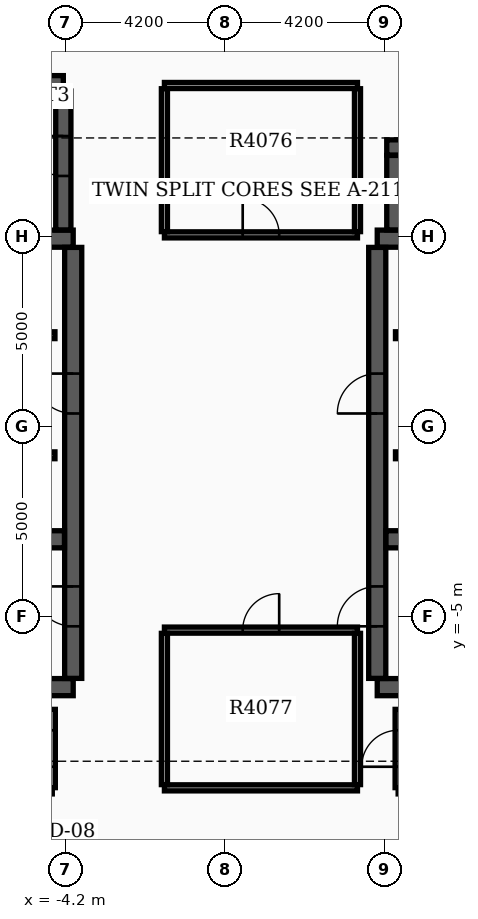
"""IFC4 building model, lengths in metres.
Left out: names, types, materials, properties, quantities, classifications, styles, units other than length and angle.
Written with IfcOpenShell. Run it as: python <this file> out.ifc"""

import sys

from ifc_helpers import new_model, si_unit, direction, frame, frame_2d, origin, place, context, subcontext, project, spatial, rectangle, extrude, element, fill, save


model = new_model("IFC4")
c1 = context("Model", 3, precision=1e-05, world=origin(), true_north=direction((0.0, 1.0)))
c2 = subcontext(c1, "Body", "Model", "MODEL_VIEW")
j1 = project(units=[si_unit("LENGTHUNIT", "METRE"), si_unit("PLANEANGLEUNIT", "RADIAN")], contexts=[c1])
p1 = place(None, origin())
s1 = spatial("IfcSite", under=j1, at=p1, CompositionType="ELEMENT")
p2 = place(p1, origin())
s2 = spatial("IfcBuilding", under=s1, at=p2, CompositionType="ELEMENT")
p3 = place(p2, frame((0.0, 0.0, 257.7)))
s3 = spatial("IfcBuildingStorey", under=s2, at=p3, CompositionType="ELEMENT", Elevation=257.7)
for number, where, z_axis, x_axis in (
    (1, (-12.4, -6.85, 0.0), (0.0, 0.0, 1.0), (1.0, 0.0, 0.0)),
    (2, (-12.4, 4.95, 0.0), (0.0, 0.0, 1.0), (1.0, 0.0, 0.0)),
):
    element("IfcWall", number, at=place(p3, frame(where, z_axis=z_axis, x_axis=x_axis)), inside=s3, PredefinedType="SHEAR", context=c2, shape_type="SweptSolid", body=[
        extrude(rectangle(XDim=8.4, YDim=0.45, at=frame_2d((4.2, 0.0))), origin(), (0.0, 0.0, 1.0), 3.7),
    ])
p4 = place(p3, frame((-4.0, -6.62, 0.0), z_axis=(0.0, 0.0, 1.0), x_axis=(0.0, 1.0, 0.0)))
e3 = element("IfcWall", 3, at=p4, inside=s3, PredefinedType="SHEAR", context=c2, shape_type="SweptSolid", body=[
    extrude(rectangle(XDim=11.34, YDim=0.45, at=frame_2d((5.67, 0.0))), origin(), (0.0, 0.0, 1.0), 3.7),
])
p5 = place(p4, frame((1.37, 0.0, 0.0)))
e4 = element("IfcOpeningElement", 4, at=p5, cuts=e3, PredefinedType="OPENING", context=c2, shape_type="SweptSolid", body=[
    extrude(rectangle(XDim=1.05, YDim=2.15, at=frame_2d((0.525, 1.075))), frame((0.0, 0.235, 0.0), z_axis=(0.0, -1.0, 0.0), x_axis=(1.0, 0.0, 0.0)), (0.0, 0.0, 1.0), 0.47),
])
p6 = place(p4, frame((6.97, 0.0, 0.0)))
e5 = element("IfcOpeningElement", 5, at=p6, cuts=e3, PredefinedType="OPENING", context=c2, shape_type="SweptSolid", body=[
    extrude(rectangle(XDim=1.05, YDim=2.15, at=frame_2d((0.525, 1.075))), frame((0.0, 0.235, 0.0), z_axis=(0.0, -1.0, 0.0), x_axis=(1.0, 0.0, 0.0)), (0.0, 0.0, 1.0), 0.47),
])
p7 = place(p3, frame((-12.17, -2.96, 0.0), z_axis=(0.0, 0.0, 1.0), x_axis=(1.0, 0.0, 0.0)))
e6 = element("IfcWall", 6, at=p7, inside=s3, PredefinedType="SHEAR", context=c2, shape_type="SweptSolid", body=[
    extrude(rectangle(XDim=7.94, YDim=0.45, at=frame_2d((3.97, 0.0))), origin(), (0.0, 0.0, 1.0), 3.7),
])
for number, where, z_axis, x_axis in (
    (7, (4.0, -6.85, 0.0), (0.0, 0.0, 1.0), (1.0, 0.0, 0.0)),
    (8, (4.0, 4.95, 0.0), (0.0, 0.0, 1.0), (1.0, 0.0, 0.0)),
):
    element("IfcWall", number, at=place(p3, frame(where, z_axis=z_axis, x_axis=x_axis)), inside=s3, PredefinedType="SHEAR", context=c2, shape_type="SweptSolid", body=[
        extrude(rectangle(XDim=8.4, YDim=0.45, at=frame_2d((4.2, 0.0))), origin(), (0.0, 0.0, 1.0), 3.7),
    ])
p8 = place(p3, frame((4.0, -6.62, 0.0), z_axis=(0.0, 0.0, 1.0), x_axis=(0.0, 1.0, 0.0)))
e9 = element("IfcWall", 9, at=p8, inside=s3, PredefinedType="SHEAR", context=c2, shape_type="SweptSolid", body=[
    extrude(rectangle(XDim=11.34, YDim=0.45, at=frame_2d((5.67, 0.0))), origin(), (0.0, 0.0, 1.0), 3.7),
])
p9 = place(p8, frame((1.37, 0.0, 0.0)))
e10 = element("IfcOpeningElement", 10, at=p9, cuts=e9, PredefinedType="OPENING", context=c2, shape_type="SweptSolid", body=[
    extrude(rectangle(XDim=1.05, YDim=2.15, at=frame_2d((0.525, 1.075))), frame((0.0, 0.235, 0.0), z_axis=(0.0, -1.0, 0.0), x_axis=(1.0, 0.0, 0.0)), (0.0, 0.0, 1.0), 0.47),
])
p10 = place(p8, frame((6.97, 0.0, 0.0)))
e11 = element("IfcOpeningElement", 11, at=p10, cuts=e9, PredefinedType="OPENING", context=c2, shape_type="SweptSolid", body=[
    extrude(rectangle(XDim=1.05, YDim=2.15, at=frame_2d((0.525, 1.075))), frame((0.0, 0.235, 0.0), z_axis=(0.0, -1.0, 0.0), x_axis=(1.0, 0.0, 0.0)), (0.0, 0.0, 1.0), 0.47),
])
p11 = place(p3, frame((4.23, -2.96, 0.0), z_axis=(0.0, 0.0, 1.0), x_axis=(1.0, 0.0, 0.0)))
e12 = element("IfcWall", 12, at=p11, inside=s3, PredefinedType="SHEAR", context=c2, shape_type="SweptSolid", body=[
    extrude(rectangle(XDim=7.94, YDim=0.45, at=frame_2d((3.97, 0.0))), origin(), (0.0, 0.0, 1.0), 3.7),
])
p12 = place(p3, frame((-12.22, 9.04, 0.0), z_axis=(0.0, 0.0, 1.0), x_axis=(1.0, 0.0, 0.0)))
e13 = element("IfcWall", 13, at=p12, inside=s3, PredefinedType="SHEAR", context=c2, shape_type="SweptSolid", body=[
    extrude(rectangle(XDim=7.96, YDim=0.4, at=frame_2d((3.98, 0.0))), origin(), (0.0, 0.0, 1.0), 3.7),
])
p13 = place(p3, frame((-4.26, 5.18, 0.0), z_axis=(0.0, 0.0, 1.0), x_axis=(0.0, 1.0, 0.0)))
e14 = element("IfcWall", 14, at=p13, inside=s3, PredefinedType="SHEAR", context=c2, shape_type="SweptSolid", body=[
    extrude(rectangle(XDim=3.655, YDim=0.4, at=frame_2d((1.828, 0.0))), origin(), (0.0, 0.0, 1.0), 3.7),
])
p14 = place(p13, frame((1.42, 0.0, 0.0)))
e15 = element("IfcOpeningElement", 15, at=p14, cuts=e14, PredefinedType="OPENING", context=c2, shape_type="SweptSolid", body=[
    extrude(rectangle(XDim=1.05, YDim=2.15, at=frame_2d((0.525, 1.075))), frame((0.0, 0.21, 0.0), z_axis=(0.0, -1.0, 0.0), x_axis=(1.0, 0.0, 0.0)), (0.0, 0.0, 1.0), 0.42),
])
p15 = place(p3, frame((4.45, 5.18, 0.0), z_axis=(0.0, 0.0, 1.0), x_axis=(0.0, 1.0, 0.0)))
e16 = element("IfcWall", 16, at=p15, inside=s3, PredefinedType="SHEAR", context=c2, shape_type="SweptSolid", body=[
    extrude(rectangle(XDim=1.96, YDim=0.4, at=frame_2d((0.98, 0.0))), origin(), (0.0, 0.0, 1.0), 3.7),
])
p16 = place(p3, frame((4.25, 7.35, 0.0), z_axis=(0.0, 0.0, 1.0), x_axis=(1.0, 0.0, 0.0)))
e17 = element("IfcWall", 17, at=p16, inside=s3, PredefinedType="SHEAR", context=c2, shape_type="SweptSolid", body=[
    extrude(rectangle(XDim=5.4, YDim=0.4, at=frame_2d((2.7, 0.0))), origin(), (0.0, 0.0, 1.0), 3.7),
])
p17 = place(p3, frame((-11.9, 2.41, 0.0), z_axis=(0.0, 0.0, 1.0), x_axis=(1.0, 0.0, 0.0)))
e18 = element("IfcWall", 18, at=p17, inside=s3, PredefinedType="SOLIDWALL", context=c2, shape_type="SweptSolid", body=[
    extrude(rectangle(XDim=7.42, YDim=0.18, at=frame_2d((3.71, 0.0))), origin(), (0.0, 0.0, 1.0), 3.17),
])
p18 = place(p17, frame((0.55, 0.0, 0.0)))
e19 = element("IfcOpeningElement", 19, at=p18, cuts=e18, PredefinedType="OPENING", context=c2, shape_type="SweptSolid", body=[
    extrude(rectangle(XDim=1.1, YDim=2.15, at=frame_2d((0.55, 1.075))), frame((0.0, 0.1, 0.0), z_axis=(0.0, -1.0, 0.0), x_axis=(1.0, 0.0, 0.0)), (0.0, 0.0, 1.0), 0.2),
])
p19 = place(p17, frame((4.9, 0.0, 0.0)))
e20 = element("IfcOpeningElement", 20, at=p19, cuts=e18, PredefinedType="OPENING", context=c2, shape_type="SweptSolid", body=[
    extrude(rectangle(XDim=0.88, YDim=2.1, at=frame_2d((0.44, 1.05))), frame((0.0, 0.1, 0.0), z_axis=(0.0, -1.0, 0.0), x_axis=(1.0, 0.0, 0.0)), (0.0, 0.0, 1.0), 0.2),
])
p20 = place(p3, frame((4.48, 2.41, 0.0), z_axis=(0.0, 0.0, 1.0), x_axis=(1.0, 0.0, 0.0)))
e21 = element("IfcWall", 21, at=p20, inside=s3, PredefinedType="SOLIDWALL", context=c2, shape_type="SweptSolid", body=[
    extrude(rectangle(XDim=7.42, YDim=0.18, at=frame_2d((3.71, 0.0))), origin(), (0.0, 0.0, 1.0), 3.17),
])
p21 = place(p20, frame((5.67, 0.0, 0.0)))
e22 = element("IfcOpeningElement", 22, at=p21, cuts=e21, PredefinedType="OPENING", context=c2, shape_type="SweptSolid", body=[
    extrude(rectangle(XDim=1.1, YDim=2.15, at=frame_2d((0.55, 1.075))), frame((0.0, 0.1, 0.0), z_axis=(0.0, -1.0, 0.0), x_axis=(1.0, 0.0, 0.0)), (0.0, 0.0, 1.0), 0.2),
])
p22 = place(p20, frame((1.6, 0.0, 0.0)))
e23 = element("IfcOpeningElement", 23, at=p22, cuts=e21, PredefinedType="OPENING", context=c2, shape_type="SweptSolid", body=[
    extrude(rectangle(XDim=0.88, YDim=2.1, at=frame_2d((0.44, 1.05))), frame((0.0, 0.1, 0.0), z_axis=(0.0, -1.0, 0.0), x_axis=(1.0, 0.0, 0.0)), (0.0, 0.0, 1.0), 0.2),
])
p23 = place(p3, frame((-11.9, -0.75, 0.0), z_axis=(0.0, 0.0, 1.0), x_axis=(1.0, 0.0, 0.0)))
e24 = element("IfcWall", 24, at=p23, inside=s3, PredefinedType="SOLIDWALL", context=c2, shape_type="SweptSolid", body=[
    extrude(rectangle(XDim=7.42, YDim=0.18, at=frame_2d((3.71, 0.0))), origin(), (0.0, 0.0, 1.0), 3.17),
])
p24 = place(p23, frame((5.75, 0.0, 0.0)))
e25 = element("IfcOpeningElement", 25, at=p24, cuts=e24, PredefinedType="OPENING", context=c2, shape_type="SweptSolid", body=[
    extrude(rectangle(XDim=1.1, YDim=2.15, at=frame_2d((0.55, 1.075))), frame((0.0, 0.1, 0.0), z_axis=(0.0, -1.0, 0.0), x_axis=(1.0, 0.0, 0.0)), (0.0, 0.0, 1.0), 0.2),
])
p25 = place(p23, frame((1.6, 0.0, 0.0)))
e26 = element("IfcOpeningElement", 26, at=p25, cuts=e24, PredefinedType="OPENING", context=c2, shape_type="SweptSolid", body=[
    extrude(rectangle(XDim=0.88, YDim=2.1, at=frame_2d((0.44, 1.05))), frame((0.0, 0.1, 0.0), z_axis=(0.0, -1.0, 0.0), x_axis=(1.0, 0.0, 0.0)), (0.0, 0.0, 1.0), 0.2),
])
p26 = place(p3, frame((4.48, -0.75, 0.0), z_axis=(0.0, 0.0, 1.0), x_axis=(1.0, 0.0, 0.0)))
e27 = element("IfcWall", 27, at=p26, inside=s3, PredefinedType="SOLIDWALL", context=c2, shape_type="SweptSolid", body=[
    extrude(rectangle(XDim=7.42, YDim=0.18, at=frame_2d((3.71, 0.0))), origin(), (0.0, 0.0, 1.0), 3.17),
])
p27 = place(p26, frame((3.92, 0.0, 0.0)))
e28 = element("IfcOpeningElement", 28, at=p27, cuts=e27, PredefinedType="OPENING", context=c2, shape_type="SweptSolid", body=[
    extrude(rectangle(XDim=1.1, YDim=2.15, at=frame_2d((0.55, 1.075))), frame((0.0, 0.1, 0.0), z_axis=(0.0, -1.0, 0.0), x_axis=(1.0, 0.0, 0.0)), (0.0, 0.0, 1.0), 0.2),
])
p28 = place(p26, frame((5.82, 0.0, 0.0)))
e29 = element("IfcOpeningElement", 29, at=p28, cuts=e27, PredefinedType="OPENING", context=c2, shape_type="SweptSolid", body=[
    extrude(rectangle(XDim=1.1, YDim=2.15, at=frame_2d((0.55, 1.075))), frame((0.0, 0.1, 0.0), z_axis=(0.0, -1.0, 0.0), x_axis=(1.0, 0.0, 0.0)), (0.0, 0.0, 1.0), 0.2),
])
p29 = place(p26, frame((1.6, 0.0, 0.0)))
e30 = element("IfcOpeningElement", 30, at=p29, cuts=e27, PredefinedType="OPENING", context=c2, shape_type="SweptSolid", body=[
    extrude(rectangle(XDim=0.88, YDim=2.1, at=frame_2d((0.44, 1.05))), frame((0.0, 0.1, 0.0), z_axis=(0.0, -1.0, 0.0), x_axis=(1.0, 0.0, 0.0)), (0.0, 0.0, 1.0), 0.2),
])
p30 = place(p3, frame((-1.6, 5.05, 0.0), z_axis=(0.0, 0.0, 1.0), x_axis=(1.0, 0.0, 0.0)))
e31 = element("IfcWall", 31, at=p30, inside=s3, PredefinedType="PARTITIONING", context=c2, shape_type="SweptSolid", body=[
    extrude(rectangle(XDim=5.08, YDim=0.16, at=frame_2d((2.54, 0.0))), origin(), (0.0, 0.0, 1.0), 3.17),
])
p31 = place(p30, frame((2.06, 0.0, 0.0)))
e32 = element("IfcOpeningElement", 32, at=p31, cuts=e31, PredefinedType="OPENING", context=c2, shape_type="SweptSolid", body=[
    extrude(rectangle(XDim=0.96, YDim=2.15, at=frame_2d((0.48, 1.075))), frame((0.0, 0.09, 0.0), z_axis=(0.0, -1.0, 0.0), x_axis=(1.0, 0.0, 0.0)), (0.0, 0.0, 1.0), 0.18),
])
p32 = place(p3, frame((-1.6, 8.98, 0.0), z_axis=(0.0, 0.0, 1.0), x_axis=(1.0, 0.0, 0.0)))
e33 = element("IfcWall", 33, at=p32, inside=s3, PredefinedType="PARTITIONING", context=c2, shape_type="SweptSolid", body=[
    extrude(rectangle(XDim=5.08, YDim=0.16, at=frame_2d((2.54, 0.0))), origin(), (0.0, 0.0, 1.0), 3.17),
])
for number, where, z_axis, x_axis in (
    (34, (-1.6, 5.135, 0.0), (0.0, 0.0, 1.0), (0.0, 1.0, 0.0)),
    (35, (3.48, 5.135, 0.0), (0.0, 0.0, 1.0), (0.0, 1.0, 0.0)),
):
    element("IfcWall", number, at=place(p3, frame(where, z_axis=z_axis, x_axis=x_axis)), inside=s3, PredefinedType="PARTITIONING", context=c2, shape_type="SweptSolid", body=[
        extrude(rectangle(XDim=3.76, YDim=0.16, at=frame_2d((1.88, 0.0))), origin(), (0.0, 0.0, 1.0), 3.17),
    ])
p33 = place(p3, frame((-1.6, -9.5, 0.0), z_axis=(0.0, 0.0, 1.0), x_axis=(1.0, 0.0, 0.0)))
e36 = element("IfcWall", 36, at=p33, inside=s3, PredefinedType="PARTITIONING", context=c2, shape_type="SweptSolid", body=[
    extrude(rectangle(XDim=5.08, YDim=0.16, at=frame_2d((2.54, 0.0))), origin(), (0.0, 0.0, 1.0), 3.17),
])
p34 = place(p3, frame((-1.6, -5.35, 0.0), z_axis=(0.0, 0.0, 1.0), x_axis=(1.0, 0.0, 0.0)))
e37 = element("IfcWall", 37, at=p34, inside=s3, PredefinedType="PARTITIONING", context=c2, shape_type="SweptSolid", body=[
    extrude(rectangle(XDim=5.08, YDim=0.16, at=frame_2d((2.54, 0.0))), origin(), (0.0, 0.0, 1.0), 3.17),
])
p35 = place(p34, frame((2.06, 0.0, 0.0)))
e38 = element("IfcOpeningElement", 38, at=p35, cuts=e37, PredefinedType="OPENING", context=c2, shape_type="SweptSolid", body=[
    extrude(rectangle(XDim=0.96, YDim=2.15, at=frame_2d((0.48, 1.075))), frame((0.0, 0.09, 0.0), z_axis=(0.0, -1.0, 0.0), x_axis=(1.0, 0.0, 0.0)), (0.0, 0.0, 1.0), 0.18),
])
for number, where, z_axis, x_axis in (
    (39, (-1.6, -9.415, 0.0), (0.0, 0.0, 1.0), (0.0, 1.0, 0.0)),
    (40, (3.48, -9.415, 0.0), (0.0, 0.0, 1.0), (0.0, 1.0, 0.0)),
):
    element("IfcWall", number, at=place(p3, frame(where, z_axis=z_axis, x_axis=x_axis)), inside=s3, PredefinedType="PARTITIONING", context=c2, shape_type="SweptSolid", body=[
        extrude(rectangle(XDim=3.98, YDim=0.16, at=frame_2d((1.99, 0.0))), origin(), (0.0, 0.0, 1.0), 3.17),
    ])
p36 = place(p3, frame((4.55, -9.58, 0.0), z_axis=(0.0, 0.0, 1.0), x_axis=(1.0, 0.0, 0.0)))
e41 = element("IfcWall", 41, at=p36, inside=s3, PredefinedType="PARTITIONING", context=c2, shape_type="SweptSolid", body=[
    extrude(rectangle(XDim=8.1, YDim=0.16, at=frame_2d((4.05, 0.0))), origin(), (0.0, 0.0, 1.0), 3.17),
])
p37 = place(p3, frame((4.55, -9.495, 0.0), z_axis=(0.0, 0.0, 1.0), x_axis=(0.0, 1.0, 0.0)))
e42 = element("IfcWall", 42, at=p37, inside=s3, PredefinedType="PARTITIONING", context=c2, shape_type="SweptSolid", body=[
    extrude(rectangle(XDim=2.06, YDim=0.16, at=frame_2d((1.03, 0.0))), origin(), (0.0, 0.0, 1.0), 3.17),
])
p38 = place(p37, frame((0.55, 0.0, 0.0)))
e43 = element("IfcOpeningElement", 43, at=p38, cuts=e42, PredefinedType="OPENING", context=c2, shape_type="SweptSolid", body=[
    extrude(rectangle(XDim=0.96, YDim=2.15, at=frame_2d((0.48, 1.075))), frame((0.0, 0.09, 0.0), z_axis=(0.0, -1.0, 0.0), x_axis=(1.0, 0.0, 0.0)), (0.0, 0.0, 1.0), 0.18),
])
p39 = place(p3, frame((-4.55, -9.495, 0.0), z_axis=(0.0, 0.0, 1.0), x_axis=(0.0, 1.0, 0.0)))
e44 = element("IfcWall", 44, at=p39, inside=s3, PredefinedType="PARTITIONING", context=c2, shape_type="SweptSolid", body=[
    extrude(rectangle(XDim=2.06, YDim=0.16, at=frame_2d((1.03, 0.0))), origin(), (0.0, 0.0, 1.0), 3.17),
])
p40 = place(p39, frame((0.55, 0.0, 0.0)))
e45 = element("IfcOpeningElement", 45, at=p40, cuts=e44, PredefinedType="OPENING", context=c2, shape_type="SweptSolid", body=[
    extrude(rectangle(XDim=0.96, YDim=2.15, at=frame_2d((0.48, 1.075))), frame((0.0, 0.09, 0.0), z_axis=(0.0, -1.0, 0.0), x_axis=(1.0, 0.0, 0.0)), (0.0, 0.0, 1.0), 0.18),
])
p41 = place(p5, origin())
e46 = element("IfcDoor", 46, at=p41, inside=s3, OperationType="SINGLE_SWING_RIGHT", PredefinedType="DOOR", context=c2, shape_type="SweptSolid", body=[
    extrude(rectangle(XDim=1.05, YDim=2.15, at=frame_2d((0.525, 1.075))), frame((0.0, 0.025, 0.0), z_axis=(0.0, -1.0, 0.0), x_axis=(1.0, 0.0, 0.0)), (0.0, 0.0, 1.0), 0.05),
])
fill(e4, e46)
p42 = place(p9, origin())
e47 = element("IfcDoor", 47, at=p42, inside=s3, OperationType="SINGLE_SWING_LEFT", PredefinedType="DOOR", context=c2, shape_type="SweptSolid", body=[
    extrude(rectangle(XDim=1.05, YDim=2.15, at=frame_2d((0.525, 1.075))), frame((0.0, 0.025, 0.0), z_axis=(0.0, -1.0, 0.0), x_axis=(1.0, 0.0, 0.0)), (0.0, 0.0, 1.0), 0.05),
])
fill(e10, e47)
p43 = place(p6, origin())
e48 = element("IfcDoor", 48, at=p43, inside=s3, OperationType="SINGLE_SWING_RIGHT", PredefinedType="DOOR", context=c2, shape_type="SweptSolid", body=[
    extrude(rectangle(XDim=1.05, YDim=2.15, at=frame_2d((0.525, 1.075))), frame((0.0, 0.025, 0.0), z_axis=(0.0, -1.0, 0.0), x_axis=(1.0, 0.0, 0.0)), (0.0, 0.0, 1.0), 0.05),
])
fill(e5, e48)
p44 = place(p10, origin())
e49 = element("IfcDoor", 49, at=p44, inside=s3, OperationType="SINGLE_SWING_LEFT", PredefinedType="DOOR", context=c2, shape_type="SweptSolid", body=[
    extrude(rectangle(XDim=1.05, YDim=2.15, at=frame_2d((0.525, 1.075))), frame((0.0, 0.025, 0.0), z_axis=(0.0, -1.0, 0.0), x_axis=(1.0, 0.0, 0.0)), (0.0, 0.0, 1.0), 0.05),
])
fill(e11, e49)
p45 = place(p14, origin())
e50 = element("IfcDoor", 50, at=p45, inside=s3, OperationType="SINGLE_SWING_RIGHT", PredefinedType="DOOR", context=c2, shape_type="SweptSolid", body=[
    extrude(rectangle(XDim=1.05, YDim=2.15, at=frame_2d((0.525, 1.075))), frame((0.0, 0.025, 0.0), z_axis=(0.0, -1.0, 0.0), x_axis=(1.0, 0.0, 0.0)), (0.0, 0.0, 1.0), 0.05),
])
fill(e15, e50)
p46 = place(p31, origin())
e51 = element("IfcDoor", 51, at=p46, inside=s3, OperationType="SINGLE_SWING_LEFT", PredefinedType="DOOR", context=c2, shape_type="SweptSolid", body=[
    extrude(rectangle(XDim=0.96, YDim=2.15, at=frame_2d((0.48, 1.075))), frame((0.0, 0.025, 0.0), z_axis=(0.0, -1.0, 0.0), x_axis=(1.0, 0.0, 0.0)), (0.0, 0.0, 1.0), 0.05),
])
fill(e32, e51)
p47 = place(p35, origin())
e52 = element("IfcDoor", 52, at=p47, inside=s3, OperationType="SINGLE_SWING_RIGHT", PredefinedType="DOOR", context=c2, shape_type="SweptSolid", body=[
    extrude(rectangle(XDim=0.96, YDim=2.15, at=frame_2d((0.48, 1.075))), frame((0.0, 0.025, 0.0), z_axis=(0.0, -1.0, 0.0), x_axis=(1.0, 0.0, 0.0)), (0.0, 0.0, 1.0), 0.05),
])
fill(e38, e52)
p48 = place(p38, origin())
e53 = element("IfcDoor", 53, at=p48, inside=s3, OperationType="SINGLE_SWING_LEFT", PredefinedType="DOOR", context=c2, shape_type="SweptSolid", body=[
    extrude(rectangle(XDim=0.96, YDim=2.15, at=frame_2d((0.48, 1.075))), frame((0.0, 0.025, 0.0), z_axis=(0.0, -1.0, 0.0), x_axis=(1.0, 0.0, 0.0)), (0.0, 0.0, 1.0), 0.05),
])
fill(e43, e53)
p49 = place(p40, origin())
e54 = element("IfcDoor", 54, at=p49, inside=s3, OperationType="SINGLE_SWING_RIGHT", PredefinedType="DOOR", context=c2, shape_type="SweptSolid", body=[
    extrude(rectangle(XDim=0.96, YDim=2.15, at=frame_2d((0.48, 1.075))), frame((0.0, 0.025, 0.0), z_axis=(0.0, -1.0, 0.0), x_axis=(1.0, 0.0, 0.0)), (0.0, 0.0, 1.0), 0.05),
])
fill(e45, e54)
save(model, sys.argv[1])
